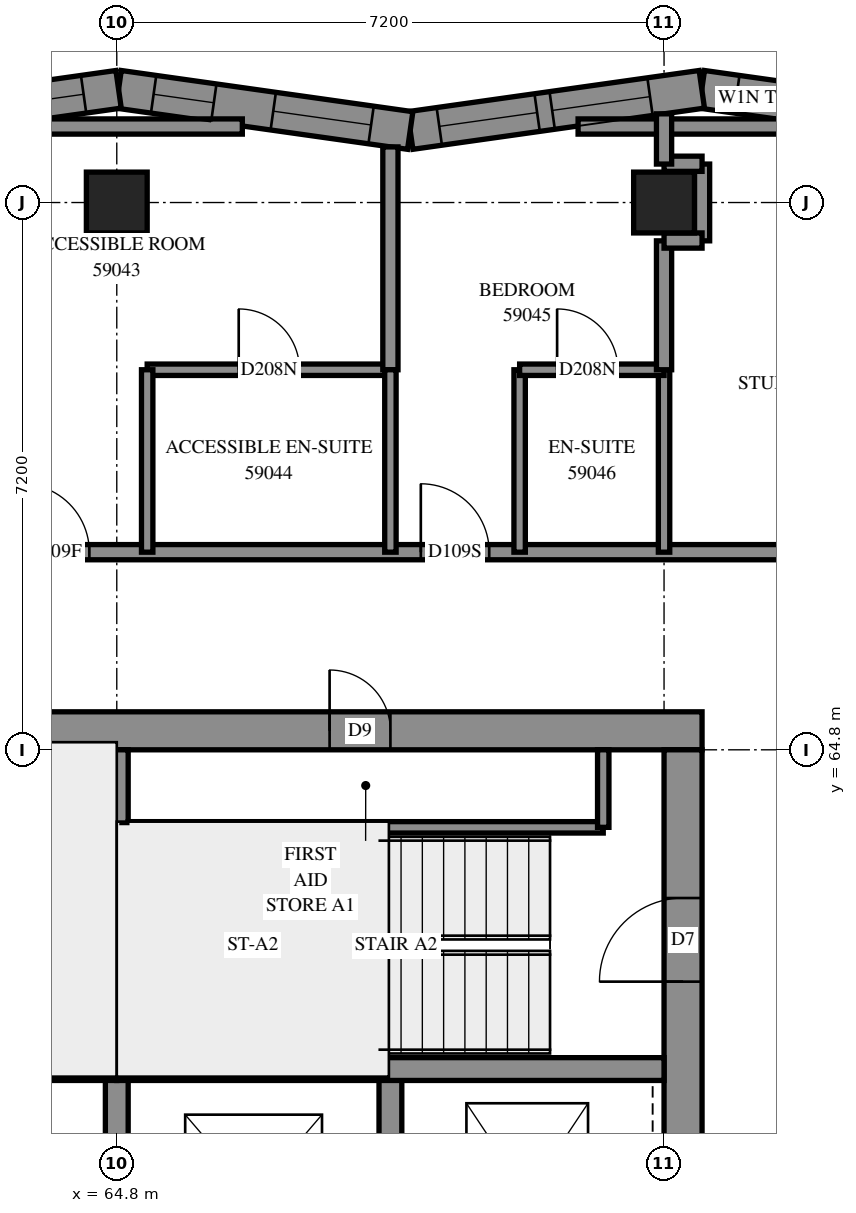
"""IFC4 building model, lengths in metres.
Left out: names, types, materials, properties, quantities, classifications, styles, units other than length and angle.
Written with IfcOpenShell. Run it as: python <this file> out.ifc"""

import sys

from ifc_helpers import new_model, si_unit, direction, frame, frame_2d, origin, origin_2d, place, context, subcontext, project, spatial, polyline, rectangle, outline, extrude, element, fill, save


model = new_model("IFC4")
c1 = context("Model", 3, precision=1e-05, world=origin(), true_north=direction((0.0, 1.0)))
c2 = subcontext(c1, "Body", "Model", "MODEL_VIEW")
j1 = project(units=[si_unit("LENGTHUNIT", "METRE"), si_unit("PLANEANGLEUNIT", "RADIAN")], contexts=[c1])
p1 = place(None, origin())
s1 = spatial("IfcSite", under=j1, at=p1, CompositionType="ELEMENT")
p2 = place(p1, origin())
s2 = spatial("IfcBuilding", under=s1, at=p2, CompositionType="ELEMENT")
p3 = place(p2, frame((0.0, 0.0, 216.8)))
s3 = spatial("IfcBuildingStorey", under=s2, at=p3, CompositionType="ELEMENT", Elevation=216.8)
for number, where, z_axis, x_axis in (
    (1, (64.8, 72.0, 0.0), (0.0, 0.0, 1.0), (1.0, 0.0, 0.0)),
    (2, (72.0, 72.0, 0.0), (0.0, 0.0, 1.0), (1.0, 0.0, 0.0)),
):
    element("IfcColumn", number, at=place(p3, frame(where, z_axis=z_axis, x_axis=x_axis)), inside=s3, PredefinedType="COLUMN", context=c2, shape_type="SweptSolid", body=[
        extrude(rectangle(XDim=0.8, YDim=0.8, at=origin_2d()), origin(), (0.0, 0.0, 1.0), 3.1),
    ])
p4 = place(p3, frame((57.1, 65.05, -0.3), z_axis=(0.0, 0.0, 1.0), x_axis=(1.0, 0.0, 0.0)))
e3 = element("IfcWall", 3, at=p4, inside=s3, PredefinedType="SHEAR", context=c2, shape_type="SweptSolid", body=[
    extrude(rectangle(XDim=15.4, YDim=0.5, at=frame_2d((7.7, 0.0))), origin(), (0.0, 0.0, 1.0), 2.7),
])
p5 = place(p4, frame((10.5, 0.0, 0.3)))
e4 = element("IfcOpeningElement", 4, at=p5, cuts=e3, PredefinedType="OPENING", context=c2, shape_type="SweptSolid", body=[
    extrude(rectangle(XDim=0.8, YDim=2.1, at=frame_2d((0.4, 1.05))), frame((0.0, 0.26, 0.0), z_axis=(0.0, -1.0, 0.0), x_axis=(1.0, 0.0, 0.0)), (0.0, 0.0, 1.0), 0.52),
])
p6 = place(p3, frame((72.25, 50.4, -0.3), z_axis=(0.0, 0.0, 1.0), x_axis=(0.0, 1.0, 0.0)))
e5 = element("IfcWall", 5, at=p6, inside=s3, PredefinedType="SHEAR", context=c2, shape_type="SweptSolid", body=[
    extrude(rectangle(XDim=14.4, YDim=0.5, at=frame_2d((7.2, 0.0))), origin(), (0.0, 0.0, 1.0), 2.7),
])
p7 = place(p6, frame((4.55, 0.0, 0.3)))
e6 = element("IfcOpeningElement", 6, at=p7, cuts=e5, PredefinedType="OPENING", context=c2, shape_type="SweptSolid", body=[
    extrude(rectangle(XDim=1.1, YDim=2.1, at=frame_2d((0.55, 1.05))), frame((0.0, 0.26, 0.0), z_axis=(0.0, -1.0, 0.0), x_axis=(1.0, 0.0, 0.0)), (0.0, 0.0, 1.0), 0.52),
])
p8 = place(p6, frame((11.35, 0.0, 0.3)))
e7 = element("IfcOpeningElement", 7, at=p8, cuts=e5, PredefinedType="OPENING", context=c2, shape_type="SweptSolid", body=[
    extrude(rectangle(XDim=1.1, YDim=2.1, at=frame_2d((0.55, 1.05))), frame((0.0, 0.26, 0.0), z_axis=(0.0, -1.0, 0.0), x_axis=(1.0, 0.0, 0.0)), (0.0, 0.0, 1.0), 0.52),
])
for number, where, z_axis, x_axis in (
    (8, (64.8, 57.3, 0.0), (0.0, 0.0, 1.0), (0.0, 1.0, 0.0)),
    (9, (68.4, 57.3, 0.0), (0.0, 0.0, 1.0), (0.0, 1.0, 0.0)),
):
    element("IfcWall", number, at=place(p3, frame(where, z_axis=z_axis, x_axis=x_axis)), inside=s3, PredefinedType="SOLIDWALL", context=c2, shape_type="SweptSolid", body=[
        extrude(rectangle(XDim=3.3, YDim=0.3, at=frame_2d((1.65, 0.0))), origin(), (0.0, 0.0, 1.0), 3.1),
    ])
for number, where, z_axis, x_axis in (
    (10, (57.6, 60.6, 0.0), (0.0, 0.0, 1.0), (1.0, 0.0, 0.0)),
    (11, (64.8, 60.6, 0.0), (0.0, 0.0, 1.0), (1.0, 0.0, 0.0)),
):
    element("IfcWall", number, at=place(p3, frame(where, z_axis=z_axis, x_axis=x_axis)), inside=s3, PredefinedType="SOLIDWALL", context=c2, shape_type="SweptSolid", body=[
        extrude(rectangle(XDim=7.2, YDim=0.3, at=frame_2d((3.6, 0.0))), origin(), (0.0, 0.0, 1.0), 3.1),
    ])
p9 = place(p3, frame((64.8, 60.6, 0.0), z_axis=(0.0, 0.0, 1.0), x_axis=(0.0, 1.0, 0.0)))
e12 = element("IfcWall", 12, at=p9, inside=s3, PredefinedType="SOLIDWALL", context=c2, shape_type="SweptSolid", body=[
    extrude(rectangle(XDim=4.2, YDim=0.3, at=frame_2d((2.1, 0.0))), origin(), (0.0, 0.0, 1.0), 3.1),
])
p10 = place(p3, frame((76.353, 72.945, 0.0), z_axis=(0.0, 0.0, 1.0), x_axis=(-0.9901676214, 0.139885959, 0.0)))
e13 = element("IfcWall", 13, at=p10, inside=s3, PredefinedType="SOLIDWALL", context=c2, shape_type="SweptSolid", body=[
    extrude(outline(polyline([(0.054, -0.25), (3.929, -0.25), (3.859, 0.25), (-0.054, 0.25), (0.054, -0.25)])), origin(), (0.0, 0.0, 1.0), 3.1),
])
p11 = place(p10, frame((0.832, 0.0, 0.45)))
e14 = element("IfcOpeningElement", 14, at=p11, cuts=e13, PredefinedType="OPENING", context=c2, shape_type="SweptSolid", body=[
    extrude(rectangle(XDim=1.0, YDim=2.5, at=frame_2d((0.5, 1.25))), frame((0.0, 0.26, 0.0), z_axis=(0.0, -1.0, 0.0), x_axis=(1.0, 0.0, 0.0)), (0.0, 0.0, 1.0), 0.52),
])
p12 = place(p10, frame((2.629, 0.0, 0.45)))
e15 = element("IfcOpeningElement", 15, at=p12, cuts=e13, PredefinedType="OPENING", context=c2, shape_type="SweptSolid", body=[
    extrude(rectangle(XDim=0.8, YDim=2.5, at=frame_2d((0.4, 1.25))), frame((0.0, 0.26, 0.0), z_axis=(0.0, -1.0, 0.0), x_axis=(1.0, 0.0, 0.0)), (0.0, 0.0, 1.0), 0.52),
])
p13 = place(p3, frame((72.497, 73.49, 0.0), z_axis=(0.0, 0.0, 1.0), x_axis=(-0.9901681853, -0.1398819675, 0.0)))
e16 = element("IfcWall", 16, at=p13, inside=s3, PredefinedType="SOLIDWALL", context=c2, shape_type="SweptSolid", body=[
    extrude(outline(polyline([(-0.035, -0.25), (3.839, -0.25), (3.91, 0.25), (0.035, 0.25), (-0.035, -0.25)])), origin(), (0.0, 0.0, 1.0), 3.1),
])
p14 = place(p13, frame((0.688, 0.0, 0.45)))
e17 = element("IfcOpeningElement", 17, at=p14, cuts=e16, PredefinedType="OPENING", context=c2, shape_type="SweptSolid", body=[
    extrude(rectangle(XDim=1.3, YDim=2.5, at=frame_2d((0.65, 1.25))), frame((0.0, 0.26, 0.0), z_axis=(0.0, -1.0, 0.0), x_axis=(1.0, 0.0, 0.0)), (0.0, 0.0, 1.0), 0.52),
])
p15 = place(p13, frame((2.188, 0.0, 0.45)))
e18 = element("IfcOpeningElement", 18, at=p15, cuts=e16, PredefinedType="OPENING", context=c2, shape_type="SweptSolid", body=[
    extrude(rectangle(XDim=1.3, YDim=2.5, at=frame_2d((0.65, 1.25))), frame((0.0, 0.26, 0.0), z_axis=(0.0, -1.0, 0.0), x_axis=(1.0, 0.0, 0.0)), (0.0, 0.0, 1.0), 0.52),
])
p16 = place(p3, frame((68.66, 72.948, 0.0), z_axis=(0.0, 0.0, 1.0), x_axis=(-0.9901681853, 0.1398819675, 0.0)))
e19 = element("IfcWall", 19, at=p16, inside=s3, PredefinedType="SOLIDWALL", context=c2, shape_type="SweptSolid", body=[
    extrude(outline(polyline([(0.035, -0.25), (3.91, -0.25), (3.839, 0.25), (-0.035, 0.25), (0.035, -0.25)])), origin(), (0.0, 0.0, 1.0), 3.1),
])
p17 = place(p16, frame((0.52, 0.0, 0.45)))
e20 = element("IfcOpeningElement", 20, at=p17, cuts=e19, PredefinedType="OPENING", context=c2, shape_type="SweptSolid", body=[
    extrude(rectangle(XDim=1.3, YDim=2.5, at=frame_2d((0.65, 1.25))), frame((0.0, 0.26, 0.0), z_axis=(0.0, -1.0, 0.0), x_axis=(1.0, 0.0, 0.0)), (0.0, 0.0, 1.0), 0.52),
])
p18 = place(p16, frame((2.609, 0.0, 0.45)))
e21 = element("IfcOpeningElement", 21, at=p18, cuts=e19, PredefinedType="OPENING", context=c2, shape_type="SweptSolid", body=[
    extrude(rectangle(XDim=0.8, YDim=2.5, at=frame_2d((0.4, 1.25))), frame((0.0, 0.26, 0.0), z_axis=(0.0, -1.0, 0.0), x_axis=(1.0, 0.0, 0.0)), (0.0, 0.0, 1.0), 0.52),
])
p19 = place(p3, frame((64.824, 73.49, 0.0), z_axis=(0.0, 0.0, 1.0), x_axis=(-0.9901681853, -0.1398819675, 0.0)))
e22 = element("IfcWall", 22, at=p19, inside=s3, PredefinedType="SOLIDWALL", context=c2, shape_type="SweptSolid", body=[
    extrude(outline(polyline([(-0.035, -0.25), (3.839, -0.25), (3.91, 0.25), (0.035, 0.25), (-0.035, -0.25)])), origin(), (0.0, 0.0, 1.0), 3.1),
])
p20 = place(p19, frame((2.055, 0.0, 0.45)))
e23 = element("IfcOpeningElement", 23, at=p20, cuts=e22, PredefinedType="OPENING", context=c2, shape_type="SweptSolid", body=[
    extrude(rectangle(XDim=1.3, YDim=2.5, at=frame_2d((0.65, 1.25))), frame((0.0, 0.26, 0.0), z_axis=(0.0, -1.0, 0.0), x_axis=(1.0, 0.0, 0.0)), (0.0, 0.0, 1.0), 0.52),
])
p21 = place(p19, frame((0.465, 0.0, 0.45)))
e24 = element("IfcOpeningElement", 24, at=p21, cuts=e22, PredefinedType="OPENING", context=c2, shape_type="SweptSolid", body=[
    extrude(rectangle(XDim=0.8, YDim=2.5, at=frame_2d((0.4, 1.25))), frame((0.0, 0.26, 0.0), z_axis=(0.0, -1.0, 0.0), x_axis=(1.0, 0.0, 0.0)), (0.0, 0.0, 1.0), 0.52),
])
p22 = place(p3, frame((64.95, 63.78, 0.0), z_axis=(0.0, 0.0, 1.0), x_axis=(1.0, 0.0, 0.0)))
e25 = element("IfcWall", 25, at=p22, inside=s3, PredefinedType="PARTITIONING", context=c2, shape_type="SweptSolid", body=[
    extrude(rectangle(XDim=6.25, YDim=0.15, at=frame_2d((3.125, 0.0))), origin(), (0.0, 0.0, 1.0), 3.1),
])
p23 = place(p3, frame((71.2, 63.78, 0.0), z_axis=(0.0, 0.0, 1.0), x_axis=(0.0, 1.0, 0.0)))
e26 = element("IfcWall", 26, at=p23, inside=s3, PredefinedType="PARTITIONING", context=c2, shape_type="SweptSolid", body=[
    extrude(rectangle(XDim=1.02, YDim=0.15, at=frame_2d((0.51, 0.0))), origin(), (0.0, 0.0, 1.0), 3.1),
])
p24 = place(p3, frame((55.0, 67.4, 0.0), z_axis=(0.0, 0.0, 1.0), x_axis=(1.0, 0.0, 0.0)))
e27 = element("IfcWall", 27, at=p24, inside=s3, PredefinedType="PARTITIONING", context=c2, shape_type="SweptSolid", body=[
    extrude(rectangle(XDim=19.6, YDim=0.2, at=frame_2d((9.8, 0.0))), origin(), (0.0, 0.0, 1.0), 3.1),
])
p25 = place(p24, frame((4.9, 0.0, 0.0)))
e28 = element("IfcOpeningElement", 28, at=p25, cuts=e27, PredefinedType="OPENING", context=c2, shape_type="SweptSolid", body=[
    extrude(rectangle(XDim=0.9, YDim=2.1, at=frame_2d((0.45, 1.05))), frame((0.0, 0.11, 0.0), z_axis=(0.0, -1.0, 0.0), x_axis=(1.0, 0.0, 0.0)), (0.0, 0.0, 1.0), 0.22),
])
p26 = place(p24, frame((8.539, 0.0, 0.0)))
e29 = element("IfcOpeningElement", 29, at=p26, cuts=e27, PredefinedType="OPENING", context=c2, shape_type="SweptSolid", body=[
    extrude(rectangle(XDim=0.9, YDim=2.1, at=frame_2d((0.45, 1.05))), frame((0.0, 0.11, 0.0), z_axis=(0.0, -1.0, 0.0), x_axis=(1.0, 0.0, 0.0)), (0.0, 0.0, 1.0), 0.22),
])
p27 = place(p24, frame((13.8, 0.0, 0.0)))
e30 = element("IfcOpeningElement", 30, at=p27, cuts=e27, PredefinedType="OPENING", context=c2, shape_type="SweptSolid", body=[
    extrude(rectangle(XDim=0.9, YDim=2.1, at=frame_2d((0.45, 1.05))), frame((0.0, 0.11, 0.0), z_axis=(0.0, -1.0, 0.0), x_axis=(1.0, 0.0, 0.0)), (0.0, 0.0, 1.0), 0.22),
])
p28 = place(p3, frame((70.869, 73.0, 0.0), z_axis=(0.0, 0.0, 1.0), x_axis=(1.0, 0.0, 0.0)))
e31 = element("IfcWall", 31, at=p28, inside=s3, PredefinedType="PARTITIONING", context=c2, shape_type="SweptSolid", body=[
    extrude(rectangle(XDim=3.256, YDim=0.2, at=frame_2d((1.628, 0.0))), origin(), (0.0, 0.0, 1.0), 3.1),
])
p29 = place(p3, frame((63.196, 73.0, 0.0), z_axis=(0.0, 0.0, 1.0), x_axis=(1.0, 0.0, 0.0)))
e32 = element("IfcWall", 32, at=p29, inside=s3, PredefinedType="PARTITIONING", context=c2, shape_type="SweptSolid", body=[
    extrude(rectangle(XDim=3.256, YDim=0.2, at=frame_2d((1.628, 0.0))), origin(), (0.0, 0.0, 1.0), 3.1),
])
p30 = place(p3, frame((65.2, 69.8, 0.0), z_axis=(0.0, 0.0, 1.0), x_axis=(1.0, 0.0, 0.0)))
e33 = element("IfcWall", 33, at=p30, inside=s3, PredefinedType="PARTITIONING", context=c2, shape_type="SweptSolid", body=[
    extrude(rectangle(XDim=3.2, YDim=0.15, at=frame_2d((1.6, 0.0))), origin(), (0.0, 0.0, 1.0), 3.1),
])
p31 = place(p30, frame((1.204, 0.0, 0.0)))
e34 = element("IfcOpeningElement", 34, at=p31, cuts=e33, PredefinedType="OPENING", context=c2, shape_type="SweptSolid", body=[
    extrude(rectangle(XDim=0.8, YDim=2.1, at=frame_2d((0.4, 1.05))), frame((0.0, 0.085, 0.0), z_axis=(0.0, -1.0, 0.0), x_axis=(1.0, 0.0, 0.0)), (0.0, 0.0, 1.0), 0.17),
])
p32 = place(p3, frame((68.4, 69.8, 0.0), z_axis=(0.0, 0.0, 1.0), x_axis=(0.0, 1.0, 0.0)))
e35 = element("IfcWall", 35, at=p32, inside=s3, PredefinedType="PARTITIONING", context=c2, shape_type="SweptSolid", body=[
    extrude(rectangle(XDim=2.932, YDim=0.2, at=frame_2d((1.466, 0.0))), origin(), (0.0, 0.0, 1.0), 3.1),
])
for number, where, z_axis, x_axis in (
    (36, (65.2, 67.4, 0.0), (0.0, 0.0, 1.0), (0.0, 1.0, 0.0)),
    (37, (68.4, 67.4, 0.0), (0.0, 0.0, 1.0), (0.0, 1.0, 0.0)),
    (38, (70.1, 67.4, 0.0), (0.0, 0.0, 1.0), (0.0, 1.0, 0.0)),
    (39, (72.0, 67.4, 0.0), (0.0, 0.0, 1.0), (0.0, 1.0, 0.0)),
):
    element("IfcWall", number, at=place(p3, frame(where, z_axis=z_axis, x_axis=x_axis)), inside=s3, PredefinedType="PARTITIONING", context=c2, shape_type="SweptSolid", body=[
        extrude(rectangle(XDim=2.4, YDim=0.15, at=frame_2d((1.2, 0.0))), origin(), (0.0, 0.0, 1.0), 3.1),
    ])
p33 = place(p3, frame((70.1, 69.8, 0.0), z_axis=(0.0, 0.0, 1.0), x_axis=(1.0, 0.0, 0.0)))
e40 = element("IfcWall", 40, at=p33, inside=s3, PredefinedType="PARTITIONING", context=c2, shape_type="SweptSolid", body=[
    extrude(rectangle(XDim=1.9, YDim=0.15, at=frame_2d((0.95, 0.0))), origin(), (0.0, 0.0, 1.0), 3.1),
])
p34 = place(p33, frame((0.493, 0.0, 0.0)))
e41 = element("IfcOpeningElement", 41, at=p34, cuts=e40, PredefinedType="OPENING", context=c2, shape_type="SweptSolid", body=[
    extrude(rectangle(XDim=0.8, YDim=2.1, at=frame_2d((0.4, 1.05))), frame((0.0, 0.085, 0.0), z_axis=(0.0, -1.0, 0.0), x_axis=(1.0, 0.0, 0.0)), (0.0, 0.0, 1.0), 0.17),
])
p35 = place(p3, frame((72.0, 69.8, 0.0), z_axis=(0.0, 0.0, 1.0), x_axis=(0.0, 1.0, 0.0)))
e42 = element("IfcWall", 42, at=p35, inside=s3, PredefinedType="PARTITIONING", context=c2, shape_type="SweptSolid", body=[
    extrude(rectangle(XDim=1.696, YDim=0.2, at=frame_2d((0.848, 0.0))), origin(), (0.0, 0.0, 1.0), 3.1),
])
p36 = place(p3, frame((72.5, 71.496, 0.0), z_axis=(0.0, 0.0, 1.0), x_axis=(0.0, 1.0, 0.0)))
e43 = element("IfcWall", 43, at=p36, inside=s3, PredefinedType="PARTITIONING", context=c2, shape_type="SweptSolid", body=[
    extrude(rectangle(XDim=1.01, YDim=0.2, at=frame_2d((0.505, 0.0))), origin(), (0.0, 0.0, 1.0), 3.1),
])
for number, where, z_axis, x_axis in (
    (44, (72.0, 71.5, 0.0), (0.0, 0.0, 1.0), (1.0, 0.0, 0.0)),
    (45, (72.0, 72.51, 0.0), (0.0, 0.0, 1.0), (1.0, 0.0, 0.0)),
):
    element("IfcWall", number, at=place(p3, frame(where, z_axis=z_axis, x_axis=x_axis)), inside=s3, PredefinedType="PARTITIONING", context=c2, shape_type="SweptSolid", body=[
        extrude(rectangle(XDim=0.5, YDim=0.2, at=frame_2d((0.25, 0.0))), origin(), (0.0, 0.0, 1.0), 3.1),
    ])
p37 = place(p3, frame((72.0, 72.506, 0.0), z_axis=(0.0, 0.0, 1.0), x_axis=(0.0, 1.0, 0.0)))
e46 = element("IfcWall", 46, at=p37, inside=s3, PredefinedType="PARTITIONING", context=c2, shape_type="SweptSolid", body=[
    extrude(rectangle(XDim=0.661, YDim=0.2, at=frame_2d((0.33, 0.0))), origin(), (0.0, 0.0, 1.0), 3.1),
])
p38 = place(p14, origin())
e47 = element("IfcWindow", 47, at=p38, inside=s3, PartitioningType="SINGLE_PANEL", PredefinedType="WINDOW", context=c2, shape_type="SweptSolid", body=[
    extrude(rectangle(XDim=1.3, YDim=2.5, at=frame_2d((0.65, 1.25))), frame((0.0, 0.12, 0.0), z_axis=(0.0, -1.0, 0.0), x_axis=(1.0, 0.0, 0.0)), (0.0, 0.0, 1.0), 0.06),
])
fill(e17, e47)
p39 = place(p15, origin())
e48 = element("IfcWindow", 48, at=p39, inside=s3, PartitioningType="SINGLE_PANEL", PredefinedType="WINDOW", context=c2, shape_type="SweptSolid", body=[
    extrude(rectangle(XDim=1.3, YDim=2.5, at=frame_2d((0.65, 1.25))), frame((0.0, 0.18, 0.0), z_axis=(0.0, -1.0, 0.0), x_axis=(1.0, 0.0, 0.0)), (0.0, 0.0, 1.0), 0.06),
])
fill(e18, e48)
p40 = place(p17, origin())
e49 = element("IfcWindow", 49, at=p40, inside=s3, PartitioningType="SINGLE_PANEL", PredefinedType="WINDOW", context=c2, shape_type="SweptSolid", body=[
    extrude(rectangle(XDim=1.3, YDim=2.5, at=frame_2d((0.65, 1.25))), frame((0.0, 0.18, 0.0), z_axis=(0.0, -1.0, 0.0), x_axis=(1.0, 0.0, 0.0)), (0.0, 0.0, 1.0), 0.06),
])
fill(e20, e49)
p41 = place(p5, origin())
e50 = element("IfcDoor", 50, at=p41, inside=s3, OperationType="SINGLE_SWING_RIGHT", PredefinedType="DOOR", context=c2, shape_type="SweptSolid", body=[
    extrude(rectangle(XDim=0.8, YDim=2.1, at=frame_2d((0.4, 1.05))), frame((0.0, 0.025, 0.0), z_axis=(0.0, -1.0, 0.0), x_axis=(1.0, 0.0, 0.0)), (0.0, 0.0, 1.0), 0.05),
])
fill(e4, e50)
p42 = place(p8, origin())
e51 = element("IfcDoor", 51, at=p42, inside=s3, OperationType="SINGLE_SWING_RIGHT", PredefinedType="DOOR", context=c2, shape_type="SweptSolid", body=[
    extrude(rectangle(XDim=1.1, YDim=2.1, at=frame_2d((0.55, 1.05))), frame((0.0, 0.025, 0.0), z_axis=(0.0, -1.0, 0.0), x_axis=(1.0, 0.0, 0.0)), (0.0, 0.0, 1.0), 0.05),
])
fill(e7, e51)
p43 = place(p26, origin())
e52 = element("IfcDoor", 52, at=p43, inside=s3, OperationType="SINGLE_SWING_LEFT", PredefinedType="DOOR", context=c2, shape_type="SweptSolid", body=[
    extrude(rectangle(XDim=0.9, YDim=2.1, at=frame_2d((0.45, 1.05))), frame((0.0, 0.025, 0.0), z_axis=(0.0, -1.0, 0.0), x_axis=(1.0, 0.0, 0.0)), (0.0, 0.0, 1.0), 0.05),
])
fill(e29, e52)
p44 = place(p31, origin())
e53 = element("IfcDoor", 53, at=p44, inside=s3, OperationType="SINGLE_SWING_RIGHT", PredefinedType="DOOR", context=c2, shape_type="SweptSolid", body=[
    extrude(rectangle(XDim=0.8, YDim=2.1, at=frame_2d((0.4, 1.05))), frame((0.0, 0.025, 0.0), z_axis=(0.0, -1.0, 0.0), x_axis=(1.0, 0.0, 0.0)), (0.0, 0.0, 1.0), 0.05),
])
fill(e34, e53)
p45 = place(p27, origin())
e54 = element("IfcDoor", 54, at=p45, inside=s3, OperationType="SINGLE_SWING_LEFT", PredefinedType="DOOR", context=c2, shape_type="SweptSolid", body=[
    extrude(rectangle(XDim=0.9, YDim=2.1, at=frame_2d((0.45, 1.05))), frame((0.0, 0.025, 0.0), z_axis=(0.0, -1.0, 0.0), x_axis=(1.0, 0.0, 0.0)), (0.0, 0.0, 1.0), 0.05),
])
fill(e30, e54)
p46 = place(p34, origin())
e55 = element("IfcDoor", 55, at=p46, inside=s3, OperationType="SINGLE_SWING_RIGHT", PredefinedType="DOOR", context=c2, shape_type="SweptSolid", body=[
    extrude(rectangle(XDim=0.8, YDim=2.1, at=frame_2d((0.4, 1.05))), frame((0.0, 0.025, 0.0), z_axis=(0.0, -1.0, 0.0), x_axis=(1.0, 0.0, 0.0)), (0.0, 0.0, 1.0), 0.05),
])
fill(e41, e55)
p47 = place(p12, origin())
e56 = element("IfcWindow", 56, at=p47, inside=s3, PartitioningType="SINGLE_PANEL", PredefinedType="WINDOW", context=c2, shape_type="SweptSolid", body=[
    extrude(rectangle(XDim=0.8, YDim=2.5, at=frame_2d((0.4, 1.25))), frame((0.0, 0.18, 0.0), z_axis=(0.0, -1.0, 0.0), x_axis=(1.0, 0.0, 0.0)), (0.0, 0.0, 1.0), 0.06),
])
fill(e15, e56)
p48 = place(p18, origin())
e57 = element("IfcWindow", 57, at=p48, inside=s3, PartitioningType="SINGLE_PANEL", PredefinedType="WINDOW", context=c2, shape_type="SweptSolid", body=[
    extrude(rectangle(XDim=0.8, YDim=2.5, at=frame_2d((0.4, 1.25))), frame((0.0, 0.18, 0.0), z_axis=(0.0, -1.0, 0.0), x_axis=(1.0, 0.0, 0.0)), (0.0, 0.0, 1.0), 0.06),
])
fill(e21, e57)
p49 = place(p21, origin())
e58 = element("IfcWindow", 58, at=p49, inside=s3, PartitioningType="SINGLE_PANEL", PredefinedType="WINDOW", context=c2, shape_type="SweptSolid", body=[
    extrude(rectangle(XDim=0.8, YDim=2.5, at=frame_2d((0.4, 1.25))), frame((0.0, 0.18, 0.0), z_axis=(0.0, -1.0, 0.0), x_axis=(1.0, 0.0, 0.0)), (0.0, 0.0, 1.0), 0.06),
])
fill(e24, e58)
save(model, sys.argv[1])
